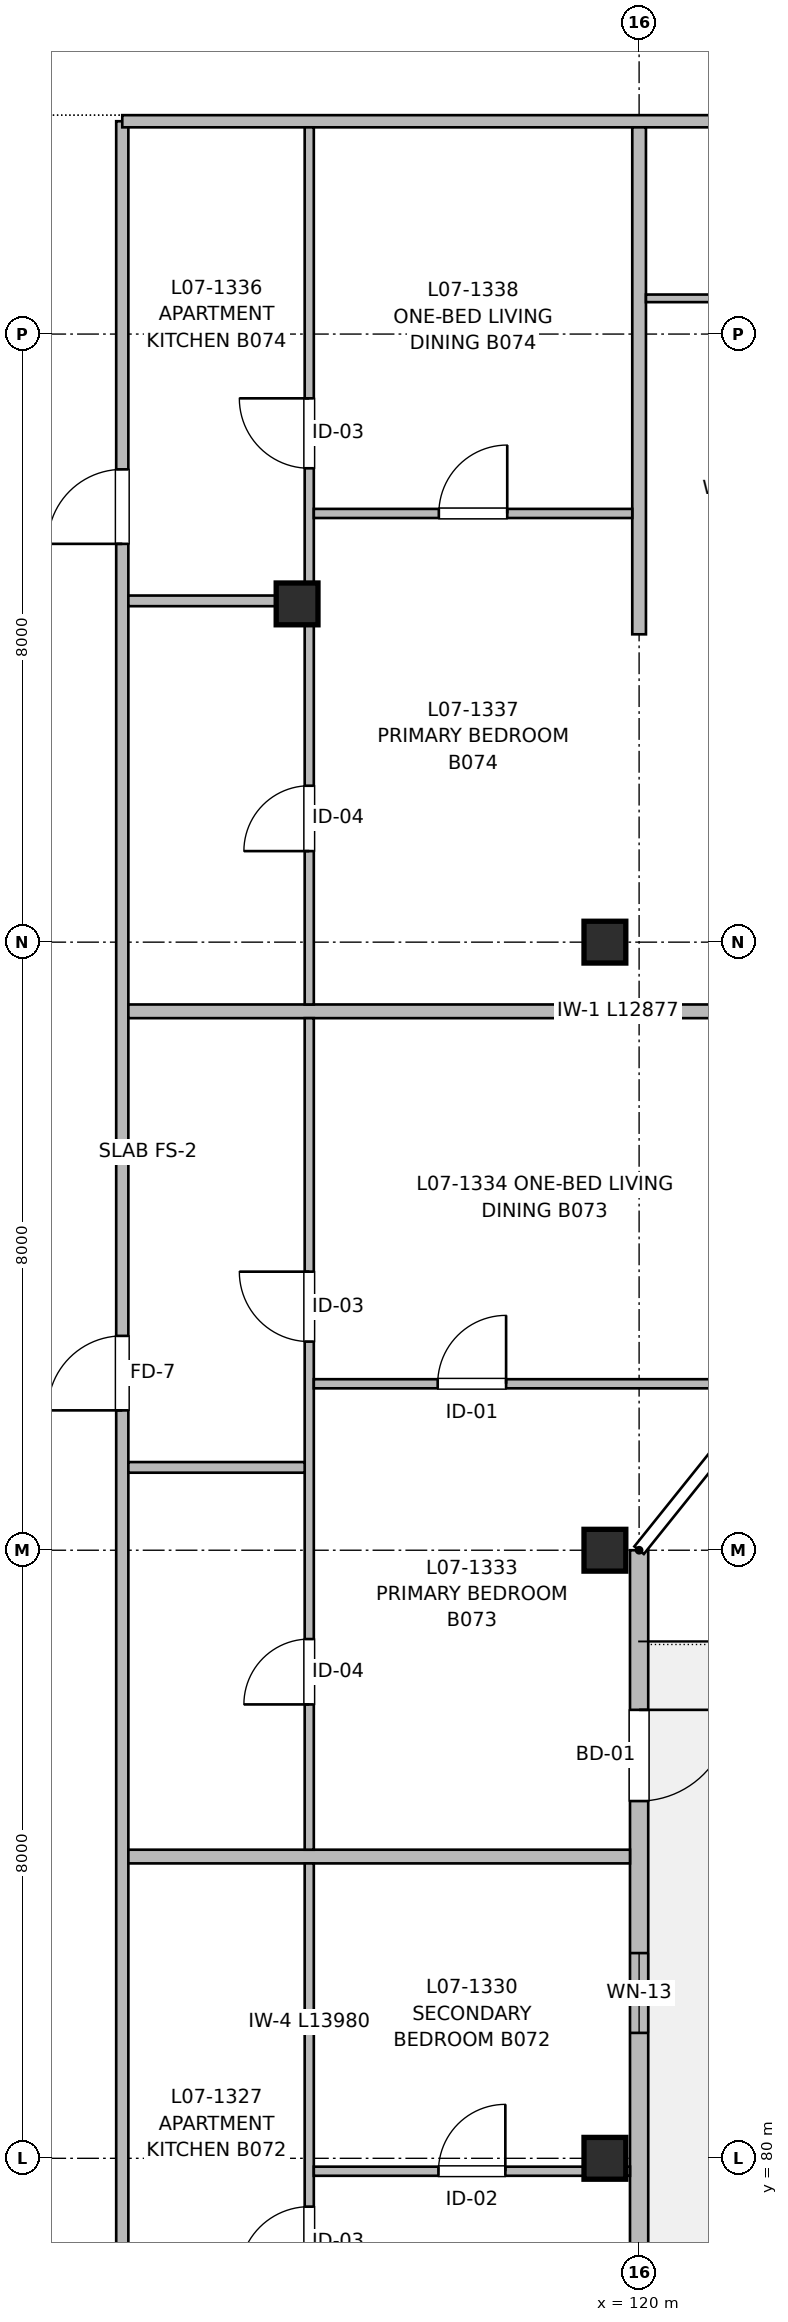
"""IFC4 building model, lengths in metres.
Left out: names, types, materials, properties, quantities, classifications, styles, units other than length and angle.
Written with IfcOpenShell. Run it as: python <this file> out.ifc"""

import sys

from ifc_helpers import new_model, si_unit, direction, frame, frame_2d, origin, origin_2d, place, context, subcontext, project, spatial, rectangle, extrude, element, fill, save


model = new_model("IFC4")
c1 = context("Model", 3, precision=1e-05, world=origin(), true_north=direction((0.0, 1.0)))
c2 = subcontext(c1, "Body", "Model", "MODEL_VIEW")
j1 = project(units=[si_unit("LENGTHUNIT", "METRE"), si_unit("PLANEANGLEUNIT", "RADIAN")], contexts=[c1])
p1 = place(None, origin())
s1 = spatial("IfcSite", under=j1, at=p1, CompositionType="ELEMENT")
p2 = place(p1, origin())
s2 = spatial("IfcBuilding", under=s1, at=p2, CompositionType="ELEMENT")
p3 = place(p2, frame((0.0, 0.0, 23.36)))
s3 = spatial("IfcBuildingStorey", under=s2, at=p3, CompositionType="ELEMENT", Elevation=23.36)
for number, where, z_axis, x_axis in (
    (1, (115.5, 100.45, 0.0), (0.0, 0.0, 1.0), (1.0, 0.0, 0.0)),
    (2, (119.55, 80.0, 0.0), (0.0, 0.0, 1.0), (1.0, 0.0, 0.0)),
    (3, (119.55, 88.0, 0.0), (0.0, 0.0, 1.0), (1.0, 0.0, 0.0)),
    (4, (119.55, 96.0, 0.0), (0.0, 0.0, 1.0), (1.0, 0.0, 0.0)),
):
    element("IfcColumn", number, at=place(p3, frame(where, z_axis=z_axis, x_axis=x_axis)), inside=s3, PredefinedType="COLUMN", context=c2, shape_type="SweptSolid", body=[
        extrude(rectangle(XDim=0.55, YDim=0.55, at=origin_2d()), origin(), (0.0, 0.0, 1.0), 3.2),
    ])
p4 = place(p3, frame((120.0, 88.0, 0.0), z_axis=(0.0, 0.0, 1.0), x_axis=(0.0, -1.0, 0.0)))
e5 = element("IfcWall", 5, at=p4, inside=s3, PredefinedType="SOLIDWALL", context=c2, shape_type="SweptSolid", body=[
    extrude(rectangle(XDim=32.0, YDim=0.24, at=frame_2d((16.0, 0.0))), origin(), (0.0, 0.0, 1.0), 2.98),
])
p5 = place(p4, frame((2.1, 0.0, 0.0)))
e6 = element("IfcOpeningElement", 6, at=p5, cuts=e5, PredefinedType="OPENING", context=c2, shape_type="SweptSolid", body=[
    extrude(rectangle(XDim=1.2, YDim=2.2, at=frame_2d((0.6, 1.1))), frame((0.0, 0.13, 0.0), z_axis=(0.0, -1.0, 0.0), x_axis=(1.0, 0.0, 0.0)), (0.0, 0.0, 1.0), 0.26),
])
p6 = place(p4, frame((5.3, 0.0, 0.9)))
e7 = element("IfcOpeningElement", 7, at=p6, cuts=e5, PredefinedType="OPENING", context=c2, shape_type="SweptSolid", body=[
    extrude(rectangle(XDim=1.05, YDim=1.15, at=frame_2d((0.525, 0.575))), frame((0.0, 0.13, 0.0), z_axis=(0.0, -1.0, 0.0), x_axis=(1.0, 0.0, 0.0)), (0.0, 0.0, 1.0), 0.26),
])
p7 = place(p4, frame((11.175, 0.0, 0.77)))
e8 = element("IfcOpeningElement", 8, at=p7, cuts=e5, PredefinedType="OPENING", context=c2, shape_type="SweptSolid", body=[
    extrude(rectangle(XDim=1.65, YDim=1.45, at=frame_2d((0.825, 0.725))), frame((0.0, 0.13, 0.0), z_axis=(0.0, -1.0, 0.0), x_axis=(1.0, 0.0, 0.0)), (0.0, 0.0, 1.0), 0.26),
])
p8 = place(p4, frame((19.2, 0.0, 0.77)))
e9 = element("IfcOpeningElement", 9, at=p8, cuts=e5, PredefinedType="OPENING", context=c2, shape_type="SweptSolid", body=[
    extrude(rectangle(XDim=1.6, YDim=1.45, at=frame_2d((0.8, 0.725))), frame((0.0, 0.13, 0.0), z_axis=(0.0, -1.0, 0.0), x_axis=(1.0, 0.0, 0.0)), (0.0, 0.0, 1.0), 0.26),
])
p9 = place(p4, frame((26.8, 0.0, 0.72)))
e10 = element("IfcOpeningElement", 10, at=p9, cuts=e5, PredefinedType="OPENING", context=c2, shape_type="SweptSolid", body=[
    extrude(rectangle(XDim=2.4, YDim=1.5, at=frame_2d((1.2, 0.75))), frame((0.0, 0.13, 0.0), z_axis=(0.0, -1.0, 0.0), x_axis=(1.0, 0.0, 0.0)), (0.0, 0.0, 1.0), 0.26),
])
p10 = place(p4, frame((15.21, 0.0, 0.82)))
e11 = element("IfcOpeningElement", 11, at=p10, cuts=e5, PredefinedType="OPENING", context=c2, shape_type="SweptSolid", body=[
    extrude(rectangle(XDim=1.5, YDim=1.4, at=frame_2d((0.75, 0.7))), frame((0.0, 0.13, 0.0), z_axis=(0.0, -1.0, 0.0), x_axis=(1.0, 0.0, 0.0)), (0.0, 0.0, 1.0), 0.26),
])
p11 = place(p3, frame((113.2, 56.16, 0.0), z_axis=(0.0, 0.0, 1.0), x_axis=(0.0, 1.0, 0.0)))
e12 = element("IfcWall", 12, at=p11, inside=s3, PredefinedType="PARTITIONING", context=c2, shape_type="SweptSolid", body=[
    extrude(rectangle(XDim=50.64, YDim=0.16, at=frame_2d((25.32, 0.0))), origin(), (0.0, 0.0, 1.0), 2.935),
])
p12 = place(p11, frame((6.03, 0.0, 0.0)))
e13 = element("IfcOpeningElement", 13, at=p12, cuts=e12, PredefinedType="OPENING", context=c2, shape_type="SweptSolid", body=[
    extrude(rectangle(XDim=1.5, YDim=2.2, at=frame_2d((0.75, 1.1))), frame((0.0, 0.09, 0.0), z_axis=(0.0, -1.0, 0.0), x_axis=(1.0, 0.0, 0.0)), (0.0, 0.0, 1.0), 0.18),
])
p13 = place(p11, frame((20.92, 0.0, 0.0)))
e14 = element("IfcOpeningElement", 14, at=p13, cuts=e12, PredefinedType="OPENING", context=c2, shape_type="SweptSolid", body=[
    extrude(rectangle(XDim=1.02, YDim=2.15, at=frame_2d((0.51, 1.075))), frame((0.0, 0.09, 0.0), z_axis=(0.0, -1.0, 0.0), x_axis=(1.0, 0.0, 0.0)), (0.0, 0.0, 1.0), 0.18),
])
p14 = place(p11, frame((33.68, 0.0, 0.0)))
e15 = element("IfcOpeningElement", 15, at=p14, cuts=e12, PredefinedType="OPENING", context=c2, shape_type="SweptSolid", body=[
    extrude(rectangle(XDim=0.98, YDim=2.15, at=frame_2d((0.49, 1.075))), frame((0.0, 0.09, 0.0), z_axis=(0.0, -1.0, 0.0), x_axis=(1.0, 0.0, 0.0)), (0.0, 0.0, 1.0), 0.18),
])
p15 = place(p11, frame((45.08, 0.0, 0.0)))
e16 = element("IfcOpeningElement", 16, at=p15, cuts=e12, PredefinedType="OPENING", context=c2, shape_type="SweptSolid", body=[
    extrude(rectangle(XDim=0.98, YDim=2.15, at=frame_2d((0.49, 1.075))), frame((0.0, 0.09, 0.0), z_axis=(0.0, -1.0, 0.0), x_axis=(1.0, 0.0, 0.0)), (0.0, 0.0, 1.0), 0.18),
])
p16 = place(p3, frame((113.2, 106.8, 0.0), z_axis=(0.0, 0.0, 1.0), x_axis=(1.0, 0.0, 0.0)))
e17 = element("IfcWall", 17, at=p16, inside=s3, PredefinedType="PARTITIONING", context=c2, shape_type="SweptSolid", body=[
    extrude(rectangle(XDim=24.14, YDim=0.16, at=frame_2d((12.07, 0.0))), origin(), (0.0, 0.0, 1.0), 2.935),
])
p17 = place(p16, frame((19.575, 0.0, 0.0)))
e18 = element("IfcOpeningElement", 18, at=p17, cuts=e17, PredefinedType="OPENING", context=c2, shape_type="SweptSolid", body=[
    extrude(rectangle(XDim=1.05, YDim=2.15, at=frame_2d((0.525, 1.075))), frame((0.0, 0.09, 0.0), z_axis=(0.0, -1.0, 0.0), x_axis=(1.0, 0.0, 0.0)), (0.0, 0.0, 1.0), 0.18),
])
p18 = place(p16, frame((8.995, 0.0, 0.0)))
e19 = element("IfcOpeningElement", 19, at=p18, cuts=e17, PredefinedType="OPENING", context=c2, shape_type="SweptSolid", body=[
    extrude(rectangle(XDim=0.98, YDim=2.15, at=frame_2d((0.49, 1.075))), frame((0.0, 0.09, 0.0), z_axis=(0.0, -1.0, 0.0), x_axis=(1.0, 0.0, 0.0)), (0.0, 0.0, 1.0), 0.18),
])
p19 = place(p3, frame((120.0, 100.05, 0.0), z_axis=(0.0, 0.0, 1.0), x_axis=(0.0, 1.0, 0.0)))
e20 = element("IfcWall", 20, at=p19, inside=s3, PredefinedType="PARTITIONING", context=c2, shape_type="SweptSolid", body=[
    extrude(rectangle(XDim=6.67, YDim=0.18, at=frame_2d((3.335, 0.0))), origin(), (0.0, 0.0, 1.0), 2.935),
])
p20 = place(p3, frame((113.28, 83.97, 0.0), z_axis=(0.0, 0.0, 1.0), x_axis=(1.0, 0.0, 0.0)))
e21 = element("IfcWall", 21, at=p20, inside=s3, PredefinedType="PARTITIONING", context=c2, shape_type="SweptSolid", body=[
    extrude(rectangle(XDim=6.6, YDim=0.18, at=frame_2d((3.3, 0.0))), origin(), (0.0, 0.0, 1.0), 2.935),
])
p21 = place(p3, frame((113.28, 95.09, 0.0), z_axis=(0.0, 0.0, 1.0), x_axis=(1.0, 0.0, 0.0)))
e22 = element("IfcWall", 22, at=p21, inside=s3, PredefinedType="PARTITIONING", context=c2, shape_type="SweptSolid", body=[
    extrude(rectangle(XDim=12.877, YDim=0.18, at=frame_2d((6.439, 0.0))), origin(), (0.0, 0.0, 1.0), 2.935),
])
p22 = place(p3, frame((115.66, 69.9, 0.0), z_axis=(0.0, 0.0, 1.0), x_axis=(0.0, 1.0, 0.0)))
e23 = element("IfcWall", 23, at=p22, inside=s3, PredefinedType="PARTITIONING", context=c2, shape_type="SweptSolid", body=[
    extrude(rectangle(XDim=13.98, YDim=0.12, at=frame_2d((6.99, 0.0))), origin(), (0.0, 0.0, 1.0), 2.935),
])
p23 = place(p22, frame((2.443, 0.0, 0.0)))
e24 = element("IfcOpeningElement", 24, at=p23, cuts=e23, PredefinedType="OPENING", context=c2, shape_type="SweptSolid", body=[
    extrude(rectangle(XDim=0.94, YDim=2.1, at=frame_2d((0.47, 1.05))), frame((0.0, 0.07, 0.0), z_axis=(0.0, -1.0, 0.0), x_axis=(1.0, 0.0, 0.0)), (0.0, 0.0, 1.0), 0.14),
])
p24 = place(p22, frame((8.544, 0.0, 0.0)))
e25 = element("IfcOpeningElement", 25, at=p24, cuts=e23, PredefinedType="OPENING", context=c2, shape_type="SweptSolid", body=[
    extrude(rectangle(XDim=0.92, YDim=2.1, at=frame_2d((0.46, 1.05))), frame((0.0, 0.07, 0.0), z_axis=(0.0, -1.0, 0.0), x_axis=(1.0, 0.0, 0.0)), (0.0, 0.0, 1.0), 0.14),
])
p25 = place(p3, frame((115.72, 79.83, 0.0), z_axis=(0.0, 0.0, 1.0), x_axis=(1.0, 0.0, 0.0)))
e26 = element("IfcWall", 26, at=p25, inside=s3, PredefinedType="PARTITIONING", context=c2, shape_type="SweptSolid", body=[
    extrude(rectangle(XDim=4.16, YDim=0.12, at=frame_2d((2.08, 0.0))), origin(), (0.0, 0.0, 1.0), 2.53),
])
p26 = place(p25, frame((1.64, 0.0, 0.0)))
e27 = element("IfcOpeningElement", 27, at=p26, cuts=e26, PredefinedType="OPENING", context=c2, shape_type="SweptSolid", body=[
    extrude(rectangle(XDim=0.88, YDim=2.1, at=frame_2d((0.44, 1.05))), frame((0.0, 0.07, 0.0), z_axis=(0.0, -1.0, 0.0), x_axis=(1.0, 0.0, 0.0)), (0.0, 0.0, 1.0), 0.14),
])
p27 = place(p3, frame((115.66, 84.06, 0.0), z_axis=(0.0, 0.0, 1.0), x_axis=(0.0, 1.0, 0.0)))
e28 = element("IfcWall", 28, at=p27, inside=s3, PredefinedType="PARTITIONING", context=c2, shape_type="SweptSolid", body=[
    extrude(rectangle(XDim=10.94, YDim=0.12, at=frame_2d((5.47, 0.0))), origin(), (0.0, 0.0, 1.0), 2.935),
])
p28 = place(p27, frame((1.911, 0.0, 0.0)))
e29 = element("IfcOpeningElement", 29, at=p28, cuts=e28, PredefinedType="OPENING", context=c2, shape_type="SweptSolid", body=[
    extrude(rectangle(XDim=0.86, YDim=2.1, at=frame_2d((0.43, 1.05))), frame((0.0, 0.07, 0.0), z_axis=(0.0, -1.0, 0.0), x_axis=(1.0, 0.0, 0.0)), (0.0, 0.0, 1.0), 0.14),
])
p29 = place(p27, frame((6.685, 0.0, 0.0)))
e30 = element("IfcOpeningElement", 30, at=p29, cuts=e28, PredefinedType="OPENING", context=c2, shape_type="SweptSolid", body=[
    extrude(rectangle(XDim=0.92, YDim=2.1, at=frame_2d((0.46, 1.05))), frame((0.0, 0.07, 0.0), z_axis=(0.0, -1.0, 0.0), x_axis=(1.0, 0.0, 0.0)), (0.0, 0.0, 1.0), 0.14),
])
p30 = place(p3, frame((113.28, 89.09, 0.0), z_axis=(0.0, 0.0, 1.0), x_axis=(1.0, 0.0, 0.0)))
e31 = element("IfcWall", 31, at=p30, inside=s3, PredefinedType="PARTITIONING", context=c2, shape_type="SweptSolid", body=[
    extrude(rectangle(XDim=2.32, YDim=0.14, at=frame_2d((1.16, 0.0))), origin(), (0.0, 0.0, 1.0), 2.935),
])
p31 = place(p3, frame((115.72, 90.19, 0.0), z_axis=(0.0, 0.0, 1.0), x_axis=(1.0, 0.0, 0.0)))
e32 = element("IfcWall", 32, at=p31, inside=s3, PredefinedType="PARTITIONING", context=c2, shape_type="SweptSolid", body=[
    extrude(rectangle(XDim=5.986, YDim=0.12, at=frame_2d((2.993, 0.0))), origin(), (0.0, 0.0, 1.0), 2.935),
])
p32 = place(p31, frame((1.63, 0.0, 0.0)))
e33 = element("IfcOpeningElement", 33, at=p32, cuts=e32, PredefinedType="OPENING", context=c2, shape_type="SweptSolid", body=[
    extrude(rectangle(XDim=0.9, YDim=2.1, at=frame_2d((0.45, 1.05))), frame((0.0, 0.07, 0.0), z_axis=(0.0, -1.0, 0.0), x_axis=(1.0, 0.0, 0.0)), (0.0, 0.0, 1.0), 0.14),
])
p33 = place(p3, frame((115.66, 95.18, 0.0), z_axis=(0.0, 0.0, 1.0), x_axis=(0.0, 1.0, 0.0)))
e34 = element("IfcWall", 34, at=p33, inside=s3, PredefinedType="PARTITIONING", context=c2, shape_type="SweptSolid", body=[
    extrude(rectangle(XDim=11.54, YDim=0.12, at=frame_2d((5.77, 0.0))), origin(), (0.0, 0.0, 1.0), 2.68),
])
p34 = place(p33, frame((2.018, 0.0, 0.0)))
e35 = element("IfcOpeningElement", 35, at=p34, cuts=e34, PredefinedType="OPENING", context=c2, shape_type="SweptSolid", body=[
    extrude(rectangle(XDim=0.86, YDim=2.1, at=frame_2d((0.43, 1.05))), frame((0.0, 0.07, 0.0), z_axis=(0.0, -1.0, 0.0), x_axis=(1.0, 0.0, 0.0)), (0.0, 0.0, 1.0), 0.14),
])
p35 = place(p33, frame((7.054, 0.0, 0.0)))
e36 = element("IfcOpeningElement", 36, at=p35, cuts=e34, PredefinedType="OPENING", context=c2, shape_type="SweptSolid", body=[
    extrude(rectangle(XDim=0.92, YDim=2.1, at=frame_2d((0.46, 1.05))), frame((0.0, 0.07, 0.0), z_axis=(0.0, -1.0, 0.0), x_axis=(1.0, 0.0, 0.0)), (0.0, 0.0, 1.0), 0.14),
])
p36 = place(p3, frame((113.28, 100.49, 0.0), z_axis=(0.0, 0.0, 1.0), x_axis=(1.0, 0.0, 0.0)))
e37 = element("IfcWall", 37, at=p36, inside=s3, PredefinedType="PARTITIONING", context=c2, shape_type="SweptSolid", body=[
    extrude(rectangle(XDim=2.32, YDim=0.14, at=frame_2d((1.16, 0.0))), origin(), (0.0, 0.0, 1.0), 2.73),
])
p37 = place(p3, frame((115.72, 101.64, 0.0), z_axis=(0.0, 0.0, 1.0), x_axis=(1.0, 0.0, 0.0)))
e38 = element("IfcWall", 38, at=p37, inside=s3, PredefinedType="PARTITIONING", context=c2, shape_type="SweptSolid", body=[
    extrude(rectangle(XDim=4.19, YDim=0.12, at=frame_2d((2.095, 0.0))), origin(), (0.0, 0.0, 1.0), 2.935),
])
p38 = place(p37, frame((1.645, 0.0, 0.0)))
e39 = element("IfcOpeningElement", 39, at=p38, cuts=e38, PredefinedType="OPENING", context=c2, shape_type="SweptSolid", body=[
    extrude(rectangle(XDim=0.9, YDim=2.1, at=frame_2d((0.45, 1.05))), frame((0.0, 0.07, 0.0), z_axis=(0.0, -1.0, 0.0), x_axis=(1.0, 0.0, 0.0)), (0.0, 0.0, 1.0), 0.14),
])
p39 = place(p3, frame((120.09, 104.47, 0.0), z_axis=(0.0, 0.0, 1.0), x_axis=(1.0, 0.0, 0.0)))
e40 = element("IfcWall", 40, at=p39, inside=s3, PredefinedType="PARTITIONING", context=c2, shape_type="SweptSolid", body=[
    extrude(rectangle(XDim=5.13, YDim=0.1, at=frame_2d((2.565, 0.0))), origin(), (0.0, 0.0, 1.0), 2.935),
])
p40 = place(p39, frame((2.18, 0.0, 0.0)))
e41 = element("IfcOpeningElement", 41, at=p40, cuts=e40, PredefinedType="OPENING", context=c2, shape_type="SweptSolid", body=[
    extrude(rectangle(XDim=0.92, YDim=2.1, at=frame_2d((0.46, 1.05))), frame((0.0, 0.06, 0.0), z_axis=(0.0, -1.0, 0.0), x_axis=(1.0, 0.0, 0.0)), (0.0, 0.0, 1.0), 0.12),
])
p41 = place(p5, origin())
e42 = element("IfcDoor", 42, at=p41, inside=s3, OperationType="SINGLE_SWING_LEFT", PredefinedType="DOOR", context=c2, shape_type="SweptSolid", body=[
    extrude(rectangle(XDim=1.2, YDim=2.2, at=frame_2d((0.6, 1.1))), frame((0.0, 0.025, 0.0), z_axis=(0.0, -1.0, 0.0), x_axis=(1.0, 0.0, 0.0)), (0.0, 0.0, 1.0), 0.05),
])
fill(e6, e42)
p42 = place(p6, origin())
e43 = element("IfcWindow", 43, at=p42, inside=s3, PartitioningType="SINGLE_PANEL", PredefinedType="WINDOW", context=c2, shape_type="SweptSolid", body=[
    extrude(rectangle(XDim=1.05, YDim=1.15, at=frame_2d((0.525, 0.575))), frame((0.0, 0.03, 0.0), z_axis=(0.0, -1.0, 0.0), x_axis=(1.0, 0.0, 0.0)), (0.0, 0.0, 1.0), 0.06),
])
fill(e7, e43)
p43 = place(p24, origin())
e44 = element("IfcDoor", 44, at=p43, inside=s3, OperationType="SINGLE_SWING_LEFT", PredefinedType="DOOR", context=c2, shape_type="SweptSolid", body=[
    extrude(rectangle(XDim=0.92, YDim=2.1, at=frame_2d((0.46, 1.05))), frame((0.0, 0.025, 0.0), z_axis=(0.0, -1.0, 0.0), x_axis=(1.0, 0.0, 0.0)), (0.0, 0.0, 1.0), 0.05),
])
fill(e25, e44)
p44 = place(p26, origin())
e45 = element("IfcDoor", 45, at=p44, inside=s3, OperationType="SINGLE_SWING_RIGHT", PredefinedType="DOOR", context=c2, shape_type="SweptSolid", body=[
    extrude(rectangle(XDim=0.88, YDim=2.1, at=frame_2d((0.44, 1.05))), frame((0.0, 0.025, 0.0), z_axis=(0.0, -1.0, 0.0), x_axis=(1.0, 0.0, 0.0)), (0.0, 0.0, 1.0), 0.05),
])
fill(e27, e45)
p45 = place(p28, origin())
e46 = element("IfcDoor", 46, at=p45, inside=s3, OperationType="SINGLE_SWING_LEFT", PredefinedType="DOOR", context=c2, shape_type="SweptSolid", body=[
    extrude(rectangle(XDim=0.86, YDim=2.1, at=frame_2d((0.43, 1.05))), frame((0.0, 0.025, 0.0), z_axis=(0.0, -1.0, 0.0), x_axis=(1.0, 0.0, 0.0)), (0.0, 0.0, 1.0), 0.05),
])
fill(e29, e46)
p46 = place(p29, origin())
e47 = element("IfcDoor", 47, at=p46, inside=s3, OperationType="SINGLE_SWING_RIGHT", PredefinedType="DOOR", context=c2, shape_type="SweptSolid", body=[
    extrude(rectangle(XDim=0.92, YDim=2.1, at=frame_2d((0.46, 1.05))), frame((0.0, 0.025, 0.0), z_axis=(0.0, -1.0, 0.0), x_axis=(1.0, 0.0, 0.0)), (0.0, 0.0, 1.0), 0.05),
])
fill(e30, e47)
p47 = place(p14, origin())
e48 = element("IfcDoor", 48, at=p47, inside=s3, OperationType="SINGLE_SWING_LEFT", PredefinedType="DOOR", context=c2, shape_type="SweptSolid", body=[
    extrude(rectangle(XDim=0.98, YDim=2.15, at=frame_2d((0.49, 1.075))), frame((0.0, 0.025, 0.0), z_axis=(0.0, -1.0, 0.0), x_axis=(1.0, 0.0, 0.0)), (0.0, 0.0, 1.0), 0.05),
])
fill(e15, e48)
p48 = place(p32, origin())
e49 = element("IfcDoor", 49, at=p48, inside=s3, OperationType="SINGLE_SWING_RIGHT", PredefinedType="DOOR", context=c2, shape_type="SweptSolid", body=[
    extrude(rectangle(XDim=0.9, YDim=2.1, at=frame_2d((0.45, 1.05))), frame((0.0, 0.025, 0.0), z_axis=(0.0, -1.0, 0.0), x_axis=(1.0, 0.0, 0.0)), (0.0, 0.0, 1.0), 0.05),
])
fill(e33, e49)
p49 = place(p34, origin())
e50 = element("IfcDoor", 50, at=p49, inside=s3, OperationType="SINGLE_SWING_LEFT", PredefinedType="DOOR", context=c2, shape_type="SweptSolid", body=[
    extrude(rectangle(XDim=0.86, YDim=2.1, at=frame_2d((0.43, 1.05))), frame((0.0, 0.025, 0.0), z_axis=(0.0, -1.0, 0.0), x_axis=(1.0, 0.0, 0.0)), (0.0, 0.0, 1.0), 0.05),
])
fill(e35, e50)
p50 = place(p35, origin())
e51 = element("IfcDoor", 51, at=p50, inside=s3, OperationType="SINGLE_SWING_RIGHT", PredefinedType="DOOR", context=c2, shape_type="SweptSolid", body=[
    extrude(rectangle(XDim=0.92, YDim=2.1, at=frame_2d((0.46, 1.05))), frame((0.0, 0.025, 0.0), z_axis=(0.0, -1.0, 0.0), x_axis=(1.0, 0.0, 0.0)), (0.0, 0.0, 1.0), 0.05),
])
fill(e36, e51)
p51 = place(p15, origin())
e52 = element("IfcDoor", 52, at=p51, inside=s3, OperationType="SINGLE_SWING_LEFT", PredefinedType="DOOR", context=c2, shape_type="SweptSolid", body=[
    extrude(rectangle(XDim=0.98, YDim=2.15, at=frame_2d((0.49, 1.075))), frame((0.0, 0.025, 0.0), z_axis=(0.0, -1.0, 0.0), x_axis=(1.0, 0.0, 0.0)), (0.0, 0.0, 1.0), 0.05),
])
fill(e16, e52)
p52 = place(p38, origin())
e53 = element("IfcDoor", 53, at=p52, inside=s3, OperationType="SINGLE_SWING_RIGHT", PredefinedType="DOOR", context=c2, shape_type="SweptSolid", body=[
    extrude(rectangle(XDim=0.9, YDim=2.1, at=frame_2d((0.45, 1.05))), frame((0.0, 0.025, 0.0), z_axis=(0.0, -1.0, 0.0), x_axis=(1.0, 0.0, 0.0)), (0.0, 0.0, 1.0), 0.05),
])
fill(e39, e53)
save(model, sys.argv[1])
